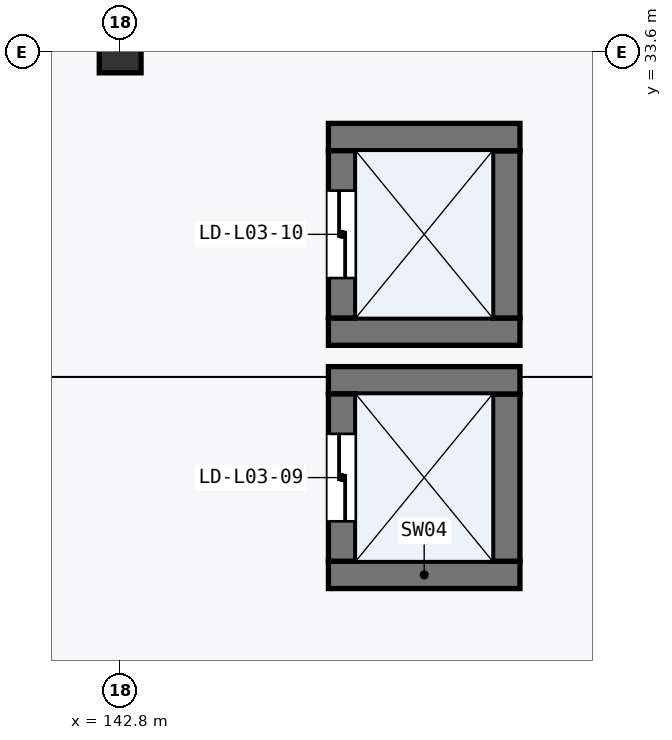
"""IFC4 building model, lengths in metres.
Left out: names, types, materials, properties, quantities, classifications, styles, units other than length and angle.
Written with IfcOpenShell. Run it as: python <this file> out.ifc"""

import sys

from ifc_helpers import new_model, si_unit, direction, frame, frame_2d, origin, origin_2d, place, context, subcontext, project, spatial, rectangle, hollow_rectangle, extrude, element, fill, save


model = new_model("IFC4")
c1 = context("Model", 3, precision=1e-05, world=origin(), true_north=direction((0.0, 1.0)))
c2 = subcontext(c1, "Body", "Model", "MODEL_VIEW")
j1 = project(units=[si_unit("LENGTHUNIT", "METRE"), si_unit("PLANEANGLEUNIT", "RADIAN")], contexts=[c1])
p1 = place(None, origin())
s1 = spatial("IfcSite", under=j1, at=p1, CompositionType="ELEMENT")
p2 = place(p1, origin())
s2 = spatial("IfcBuilding", under=s1, at=p2, CompositionType="ELEMENT")
p3 = place(p2, frame((0.0, 0.0, 11.4)))
s3 = spatial("IfcBuildingStorey", under=s2, at=p3, CompositionType="ELEMENT", Elevation=11.4)
p4 = place(p3, frame((142.8, 33.6, 0.0), z_axis=(0.0, 0.0, 1.0), x_axis=(1.0, 0.0, 0.0)))
e1 = element("IfcColumn", 1, at=p4, inside=s3, PredefinedType="COLUMN", context=c2, shape_type="SweptSolid", body=[
    extrude(hollow_rectangle(XDim=0.55, YDim=0.55, WallThickness=0.022, at=origin_2d()), origin(), (0.0, 0.0, 1.0), 5.1),
])
p5 = place(p3, frame((145.54, 26.72, 0.0), z_axis=(0.0, 0.0, 1.0), x_axis=(1.0, 0.0, 0.0)))
e2 = element("IfcWall", 2, at=p5, inside=s3, PredefinedType="SHEAR", context=c2, shape_type="SweptSolid", body=[
    extrude(rectangle(XDim=2.52, YDim=0.36, at=frame_2d((1.26, 0.0))), origin(), (0.0, 0.0, 1.0), 4.845),
])
p6 = place(p3, frame((147.88, 26.9, 0.0), z_axis=(0.0, 0.0, 1.0), x_axis=(0.0, 1.0, 0.0)))
e3 = element("IfcWall", 3, at=p6, inside=s3, PredefinedType="SHEAR", context=c2, shape_type="SweptSolid", body=[
    extrude(rectangle(XDim=2.2, YDim=0.36, at=frame_2d((1.1, 0.0))), origin(), (0.0, 0.0, 1.0), 4.845),
])
p7 = place(p3, frame((148.06, 29.28, 0.0), z_axis=(0.0, 0.0, 1.0), x_axis=(-1.0, 0.0, 0.0)))
e4 = element("IfcWall", 4, at=p7, inside=s3, PredefinedType="SHEAR", context=c2, shape_type="SweptSolid", body=[
    extrude(rectangle(XDim=2.52, YDim=0.36, at=frame_2d((1.26, 0.0))), origin(), (0.0, 0.0, 1.0), 4.845),
])
p8 = place(p3, frame((145.72, 29.1, 0.0), z_axis=(0.0, 0.0, 1.0), x_axis=(0.0, -1.0, 0.0)))
e5 = element("IfcWall", 5, at=p8, inside=s3, PredefinedType="SHEAR", context=c2, shape_type="SweptSolid", body=[
    extrude(rectangle(XDim=2.2, YDim=0.36, at=frame_2d((1.1, 0.0))), origin(), (0.0, 0.0, 1.0), 4.845),
])
p9 = place(p8, frame((0.525, 0.0, 0.0)))
e6 = element("IfcOpeningElement", 6, at=p9, cuts=e5, PredefinedType="OPENING", context=c2, shape_type="SweptSolid", body=[
    extrude(rectangle(XDim=1.15, YDim=2.2, at=frame_2d((0.575, 1.1))), frame((0.0, 0.19, 0.0), z_axis=(0.0, -1.0, 0.0), x_axis=(1.0, 0.0, 0.0)), (0.0, 0.0, 1.0), 0.38),
])
p10 = place(p3, frame((145.54, 29.92, 0.0), z_axis=(0.0, 0.0, 1.0), x_axis=(1.0, 0.0, 0.0)))
e7 = element("IfcWall", 7, at=p10, inside=s3, PredefinedType="SHEAR", context=c2, shape_type="SweptSolid", body=[
    extrude(rectangle(XDim=2.52, YDim=0.36, at=frame_2d((1.26, 0.0))), origin(), (0.0, 0.0, 1.0), 4.845),
])
p11 = place(p3, frame((147.88, 30.1, 0.0), z_axis=(0.0, 0.0, 1.0), x_axis=(0.0, 1.0, 0.0)))
e8 = element("IfcWall", 8, at=p11, inside=s3, PredefinedType="SHEAR", context=c2, shape_type="SweptSolid", body=[
    extrude(rectangle(XDim=2.2, YDim=0.36, at=frame_2d((1.1, 0.0))), origin(), (0.0, 0.0, 1.0), 4.845),
])
p12 = place(p3, frame((148.06, 32.48, 0.0), z_axis=(0.0, 0.0, 1.0), x_axis=(-1.0, 0.0, 0.0)))
e9 = element("IfcWall", 9, at=p12, inside=s3, PredefinedType="SHEAR", context=c2, shape_type="SweptSolid", body=[
    extrude(rectangle(XDim=2.52, YDim=0.36, at=frame_2d((1.26, 0.0))), origin(), (0.0, 0.0, 1.0), 4.845),
])
p13 = place(p3, frame((145.72, 32.3, 0.0), z_axis=(0.0, 0.0, 1.0), x_axis=(0.0, -1.0, 0.0)))
e10 = element("IfcWall", 10, at=p13, inside=s3, PredefinedType="SHEAR", context=c2, shape_type="SweptSolid", body=[
    extrude(rectangle(XDim=2.2, YDim=0.36, at=frame_2d((1.1, 0.0))), origin(), (0.0, 0.0, 1.0), 4.845),
])
p14 = place(p13, frame((0.525, 0.0, 0.0)))
e11 = element("IfcOpeningElement", 11, at=p14, cuts=e10, PredefinedType="OPENING", context=c2, shape_type="SweptSolid", body=[
    extrude(rectangle(XDim=1.15, YDim=2.2, at=frame_2d((0.575, 1.1))), frame((0.0, 0.19, 0.0), z_axis=(0.0, -1.0, 0.0), x_axis=(1.0, 0.0, 0.0)), (0.0, 0.0, 1.0), 0.38),
])
p15 = place(p9, frame((1.15, 0.0, 0.0), z_axis=(0.0, 0.0, 1.0), x_axis=(-1.0, 0.0, 0.0)))
e12 = element("IfcDoor", 12, at=p15, inside=s3, OperationType="DOUBLE_DOOR_SLIDING", PredefinedType="DOOR", context=c2, shape_type="SweptSolid", body=[
    extrude(rectangle(XDim=1.15, YDim=2.2, at=frame_2d((0.575, 1.1))), frame((0.0, 0.025, 0.0), z_axis=(0.0, -1.0, 0.0), x_axis=(1.0, 0.0, 0.0)), (0.0, 0.0, 1.0), 0.05),
])
fill(e6, e12)
p16 = place(p14, frame((1.15, 0.0, 0.0), z_axis=(0.0, 0.0, 1.0), x_axis=(-1.0, 0.0, 0.0)))
e13 = element("IfcDoor", 13, at=p16, inside=s3, OperationType="DOUBLE_DOOR_SLIDING", PredefinedType="DOOR", context=c2, shape_type="SweptSolid", body=[
    extrude(rectangle(XDim=1.15, YDim=2.2, at=frame_2d((0.575, 1.1))), frame((0.0, 0.025, 0.0), z_axis=(0.0, -1.0, 0.0), x_axis=(1.0, 0.0, 0.0)), (0.0, 0.0, 1.0), 0.05),
])
fill(e11, e13)
save(model, sys.argv[1])
